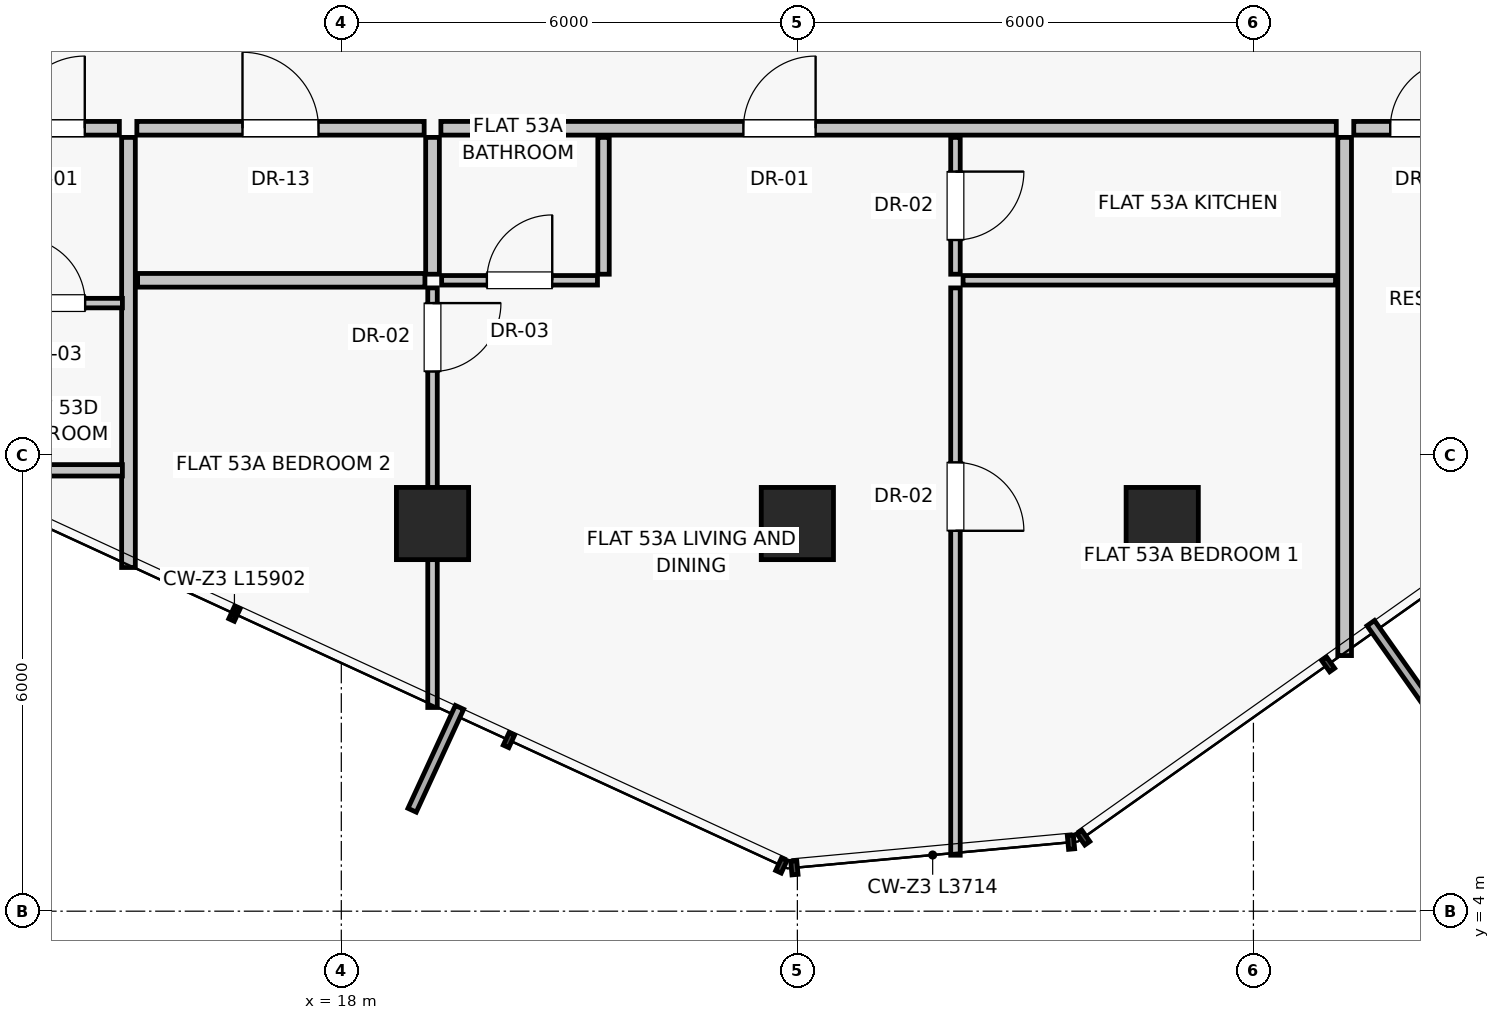
"""IFC4 building model, lengths in metres.
Left out: names, types, materials, properties, quantities, classifications, styles, units other than length and angle.
Written with IfcOpenShell. Run it as: python <this file> out.ifc"""

import sys

from ifc_helpers import new_model, si_unit, direction, frame, frame_2d, origin, origin_2d, place, context, subcontext, project, spatial, rectangle, extrude, source, transform, mapped, element, fill, save


model = new_model("IFC4")
c1 = context("Model", 3, precision=1e-05, world=origin(), true_north=direction((0.0, 1.0)))
c2 = subcontext(c1, "Body", "Model", "MODEL_VIEW")
j1 = project(units=[si_unit("LENGTHUNIT", "METRE"), si_unit("PLANEANGLEUNIT", "RADIAN")], contexts=[c1])
p1 = place(None, origin())
s1 = spatial("IfcSite", under=j1, at=p1, CompositionType="ELEMENT")
p2 = place(p1, origin())
s2 = spatial("IfcBuilding", under=s1, at=p2, CompositionType="ELEMENT")
p3 = place(p2, frame((0.0, 0.0, 188.6)))
s3 = spatial("IfcBuildingStorey", under=s2, at=p3, CompositionType="ELEMENT", Elevation=188.6)
for number, where, z_axis, x_axis in (
    (1, (19.2, 9.1, 0.0), (0.0, 0.0, 1.0), (1.0, 0.0, 0.0)),
    (2, (24.0, 9.1, 0.0), (0.0, 0.0, 1.0), (1.0, 0.0, 0.0)),
    (3, (28.8, 9.1, 0.0), (0.0, 0.0, 1.0), (1.0, 0.0, 0.0)),
):
    element("IfcColumn", number, at=place(p3, frame(where, z_axis=z_axis, x_axis=x_axis)), inside=s3, PredefinedType="COLUMN", context=c2, shape_type="SweptSolid", body=[
        extrude(rectangle(XDim=0.95, YDim=0.95, at=origin_2d()), origin(), (0.0, 0.0, 1.0), 3.25),
    ])
p4 = place(p3, frame((15.2, 14.18, 0.0), z_axis=(0.0, 0.0, 1.0), x_axis=(0.0, -1.0, 0.0)))
e4 = element("IfcWall", 4, at=p4, inside=s3, PredefinedType="PARTITIONING", context=c2, shape_type="SweptSolid", body=[
    extrude(rectangle(XDim=5.658, YDim=0.18, at=frame_2d((2.829, 0.0))), origin(), (0.0, 0.0, 1.0), 3.015),
])
p5 = place(p3, frame((31.2, 14.18, 0.0), z_axis=(0.0, 0.0, 1.0), x_axis=(0.0, -1.0, 0.0)))
e5 = element("IfcWall", 5, at=p5, inside=s3, PredefinedType="PARTITIONING", context=c2, shape_type="SweptSolid", body=[
    extrude(rectangle(XDim=6.817, YDim=0.18, at=frame_2d((3.409, 0.0))), origin(), (0.0, 0.0, 1.0), 3.015),
])
p6 = place(p3, frame((15.31, 14.3, 0.0), z_axis=(0.0, 0.0, 1.0), x_axis=(1.0, 0.0, 0.0)))
e6 = element("IfcWall", 6, at=p6, inside=s3, PredefinedType="PARTITIONING", context=c2, shape_type="SweptSolid", body=[
    extrude(rectangle(XDim=3.78, YDim=0.18, at=frame_2d((1.89, 0.0))), origin(), (0.0, 0.0, 1.0), 3.015),
])
p7 = place(p6, frame((1.39, 0.0, 0.0)))
e7 = element("IfcOpeningElement", 7, at=p7, cuts=e6, PredefinedType="OPENING", context=c2, shape_type="SweptSolid", body=[
    extrude(rectangle(XDim=1.0, YDim=2.01, at=frame_2d((0.5, 1.005))), frame((0.0, 0.1, 0.0), z_axis=(0.0, -1.0, 0.0), x_axis=(1.0, 0.0, 0.0)), (0.0, 0.0, 1.0), 0.2),
])
p8 = place(p3, frame((19.31, 14.3, 0.0), z_axis=(0.0, 0.0, 1.0), x_axis=(1.0, 0.0, 0.0)))
e8 = element("IfcWall", 8, at=p8, inside=s3, PredefinedType="PARTITIONING", context=c2, shape_type="SweptSolid", body=[
    extrude(rectangle(XDim=11.78, YDim=0.18, at=frame_2d((5.89, 0.0))), origin(), (0.0, 0.0, 1.0), 3.015),
])
p9 = place(p8, frame((3.98, 0.0, 0.0)))
e9 = element("IfcOpeningElement", 9, at=p9, cuts=e8, PredefinedType="OPENING", context=c2, shape_type="SweptSolid", body=[
    extrude(rectangle(XDim=0.95, YDim=2.02, at=frame_2d((0.475, 1.01))), frame((0.0, 0.1, 0.0), z_axis=(0.0, -1.0, 0.0), x_axis=(1.0, 0.0, 0.0)), (0.0, 0.0, 1.0), 0.2),
])
p10 = place(p3, frame((15.32, 12.3, 0.0), z_axis=(0.0, 0.0, 1.0), x_axis=(1.0, 0.0, 0.0)))
e10 = element("IfcWall", 10, at=p10, inside=s3, PredefinedType="PARTITIONING", context=c2, shape_type="SweptSolid", body=[
    extrude(rectangle(XDim=3.78, YDim=0.18, at=frame_2d((1.89, 0.0))), origin(), (0.0, 0.0, 1.0), 3.015),
])
p11 = place(p3, frame((19.2, 14.18, 0.0), z_axis=(0.0, 0.0, 1.0), x_axis=(0.0, -1.0, 0.0)))
e11 = element("IfcWall", 11, at=p11, inside=s3, PredefinedType="PARTITIONING", context=c2, shape_type="SweptSolid", body=[
    extrude(rectangle(XDim=1.8, YDim=0.18, at=frame_2d((0.9, 0.0))), origin(), (0.0, 0.0, 1.0), 3.015),
])
p12 = place(p3, frame((19.2, 12.2, 0.0), z_axis=(0.0, 0.0, 1.0), x_axis=(0.0, -1.0, 0.0)))
e12 = element("IfcWall", 12, at=p12, inside=s3, PredefinedType="PARTITIONING", context=c2, shape_type="SweptSolid", body=[
    extrude(rectangle(XDim=5.52, YDim=0.125, at=frame_2d((2.76, 0.0))), origin(), (0.0, 0.0, 1.0), 2.469),
])
p13 = place(p12, frame((0.2, 0.0, 0.0)))
e13 = element("IfcOpeningElement", 13, at=p13, cuts=e12, PredefinedType="OPENING", context=c2, shape_type="SweptSolid", body=[
    extrude(rectangle(XDim=0.9, YDim=2.01, at=frame_2d((0.45, 1.005))), frame((0.0, 0.073, 0.0), z_axis=(0.0, -1.0, 0.0), x_axis=(1.0, 0.0, 0.0)), (0.0, 0.0, 1.0), 0.145),
])
p14 = place(p3, frame((21.45, 14.18, 0.0), z_axis=(0.0, 0.0, 1.0), x_axis=(0.0, -1.0, 0.0)))
e14 = element("IfcWall", 14, at=p14, inside=s3, PredefinedType="PARTITIONING", context=c2, shape_type="SweptSolid", body=[
    extrude(rectangle(XDim=1.8, YDim=0.15, at=frame_2d((0.9, 0.0))), origin(), (0.0, 0.0, 1.0), 3.015),
])
p15 = place(p3, frame((19.32, 12.3, 0.0), z_axis=(0.0, 0.0, 1.0), x_axis=(1.0, 0.0, 0.0)))
e15 = element("IfcWall", 15, at=p15, inside=s3, PredefinedType="PARTITIONING", context=c2, shape_type="SweptSolid", body=[
    extrude(rectangle(XDim=2.05, YDim=0.125, at=frame_2d((1.025, 0.0))), origin(), (0.0, 0.0, 1.0), 3.015),
])
p16 = place(p15, frame((0.595, 0.0, 0.0)))
e16 = element("IfcOpeningElement", 16, at=p16, cuts=e15, PredefinedType="OPENING", context=c2, shape_type="SweptSolid", body=[
    extrude(rectangle(XDim=0.86, YDim=2.01, at=frame_2d((0.43, 1.005))), frame((0.0, 0.073, 0.0), z_axis=(0.0, -1.0, 0.0), x_axis=(1.0, 0.0, 0.0)), (0.0, 0.0, 1.0), 0.145),
])
p17 = place(p3, frame((26.08, 14.18, 0.0), z_axis=(0.0, 0.0, 1.0), x_axis=(0.0, -1.0, 0.0)))
e17 = element("IfcWall", 17, at=p17, inside=s3, PredefinedType="PARTITIONING", context=c2, shape_type="SweptSolid", body=[
    extrude(rectangle(XDim=1.8, YDim=0.125, at=frame_2d((0.9, 0.0))), origin(), (0.0, 0.0, 1.0), 3.015),
])
p18 = place(p17, frame((0.45, 0.0, 0.0)))
e18 = element("IfcOpeningElement", 18, at=p18, cuts=e17, PredefinedType="OPENING", context=c2, shape_type="SweptSolid", body=[
    extrude(rectangle(XDim=0.9, YDim=2.01, at=frame_2d((0.45, 1.005))), frame((0.0, 0.073, 0.0), z_axis=(0.0, -1.0, 0.0), x_axis=(1.0, 0.0, 0.0)), (0.0, 0.0, 1.0), 0.145),
])
p19 = place(p3, frame((26.18, 12.3, 0.0), z_axis=(0.0, 0.0, 1.0), x_axis=(1.0, 0.0, 0.0)))
e19 = element("IfcWall", 19, at=p19, inside=s3, PredefinedType="PARTITIONING", context=c2, shape_type="SweptSolid", body=[
    extrude(rectangle(XDim=4.9, YDim=0.125, at=frame_2d((2.45, 0.0))), origin(), (0.0, 0.0, 1.0), 3.015),
])
p20 = place(p3, frame((26.08, 12.2, 0.0), z_axis=(0.0, 0.0, 1.0), x_axis=(0.0, -1.0, 0.0)))
e20 = element("IfcWall", 20, at=p20, inside=s3, PredefinedType="PARTITIONING", context=c2, shape_type="SweptSolid", body=[
    extrude(rectangle(XDim=7.463, YDim=0.125, at=frame_2d((3.732, 0.0))), origin(), (0.0, 0.0, 1.0), 3.015),
])
p21 = place(p20, frame((2.296, 0.0, 0.0)))
e21 = element("IfcOpeningElement", 21, at=p21, cuts=e20, PredefinedType="OPENING", context=c2, shape_type="SweptSolid", body=[
    extrude(rectangle(XDim=0.9, YDim=2.01, at=frame_2d((0.45, 1.005))), frame((0.0, 0.073, 0.0), z_axis=(0.0, -1.0, 0.0), x_axis=(1.0, 0.0, 0.0)), (0.0, 0.0, 1.0), 0.145),
])
p22 = place(p3, frame((13.22, 14.3, 0.0), z_axis=(0.0, 0.0, 1.0), x_axis=(1.0, 0.0, 0.0)))
e22 = element("IfcWall", 22, at=p22, inside=s3, PredefinedType="PARTITIONING", context=c2, shape_type="SweptSolid", body=[
    extrude(rectangle(XDim=1.86, YDim=0.18, at=frame_2d((0.93, 0.0))), origin(), (0.0, 0.0, 1.0), 3.015),
])
p23 = place(p22, frame((0.455, 0.0, 0.0)))
e23 = element("IfcOpeningElement", 23, at=p23, cuts=e22, PredefinedType="OPENING", context=c2, shape_type="SweptSolid", body=[
    extrude(rectangle(XDim=0.95, YDim=2.02, at=frame_2d((0.475, 1.01))), frame((0.0, 0.1, 0.0), z_axis=(0.0, -1.0, 0.0), x_axis=(1.0, 0.0, 0.0)), (0.0, 0.0, 1.0), 0.2),
])
p24 = place(p3, frame((13.28, 12.0, 0.0), z_axis=(0.0, 0.0, 1.0), x_axis=(1.0, 0.0, 0.0)))
e24 = element("IfcWall", 24, at=p24, inside=s3, PredefinedType="PARTITIONING", context=c2, shape_type="SweptSolid", body=[
    extrude(rectangle(XDim=1.84, YDim=0.125, at=frame_2d((0.92, 0.0))), origin(), (0.0, 0.0, 1.0), 3.015),
])
p25 = place(p24, frame((0.49, 0.0, 0.0)))
e25 = element("IfcOpeningElement", 25, at=p25, cuts=e24, PredefinedType="OPENING", context=c2, shape_type="SweptSolid", body=[
    extrude(rectangle(XDim=0.86, YDim=2.01, at=frame_2d((0.43, 1.005))), frame((0.0, 0.073, 0.0), z_axis=(0.0, -1.0, 0.0), x_axis=(1.0, 0.0, 0.0)), (0.0, 0.0, 1.0), 0.145),
])
p26 = place(p3, frame((13.28, 9.8, 0.0), z_axis=(0.0, 0.0, 1.0), x_axis=(1.0, 0.0, 0.0)))
e26 = element("IfcWall", 26, at=p26, inside=s3, PredefinedType="PARTITIONING", context=c2, shape_type="SweptSolid", body=[
    extrude(rectangle(XDim=1.84, YDim=0.15, at=frame_2d((0.92, 0.0))), origin(), (0.0, 0.0, 1.0), 3.015),
])
p27 = place(p3, frame((31.32, 14.3, 0.0), z_axis=(0.0, 0.0, 1.0), x_axis=(1.0, 0.0, 0.0)))
e27 = element("IfcWall", 27, at=p27, inside=s3, PredefinedType="PARTITIONING", context=c2, shape_type="SweptSolid", body=[
    extrude(rectangle(XDim=1.86, YDim=0.18, at=frame_2d((0.93, 0.0))), origin(), (0.0, 0.0, 1.0), 3.015),
])
p28 = place(p27, frame((0.48, 0.0, 0.0)))
e28 = element("IfcOpeningElement", 28, at=p28, cuts=e27, PredefinedType="OPENING", context=c2, shape_type="SweptSolid", body=[
    extrude(rectangle(XDim=0.9, YDim=2.01, at=frame_2d((0.45, 1.005))), frame((0.0, 0.1, 0.0), z_axis=(0.0, -1.0, 0.0), x_axis=(1.0, 0.0, 0.0)), (0.0, 0.0, 1.0), 0.2),
])
m1 = source(origin(), c2, "Body", "SweptSolid", [
    extrude(rectangle(XDim=1.0, YDim=2.01, at=frame_2d((0.5, 1.005))), frame((0.0, 0.025, 0.0), z_axis=(0.0, -1.0, 0.0), x_axis=(1.0, 0.0, 0.0)), (0.0, 0.0, 1.0), 0.05),
])
p29 = place(p7, origin())
e29 = element("IfcDoor", 29, at=p29, inside=s3, OperationType="SINGLE_SWING_LEFT", PredefinedType="DOOR", context=c2, shape_type="MappedRepresentation", body=[
    mapped(m1, transform((0.0, 0.0, 0.0), scale=1.0)),
])
fill(e7, e29)
m2 = source(origin(), c2, "Body", "SweptSolid", [
    extrude(rectangle(XDim=0.95, YDim=2.02, at=frame_2d((0.475, 1.01))), frame((0.0, 0.025, 0.0), z_axis=(0.0, -1.0, 0.0), x_axis=(1.0, 0.0, 0.0)), (0.0, 0.0, 1.0), 0.05),
])
p30 = place(p9, origin())
e30 = element("IfcDoor", 30, at=p30, inside=s3, OperationType="SINGLE_SWING_RIGHT", PredefinedType="DOOR", context=c2, shape_type="MappedRepresentation", body=[
    mapped(m2, transform((0.0, 0.0, 0.0), scale=1.0)),
])
fill(e9, e30)
m3 = source(origin(), c2, "Body", "SweptSolid", [
    extrude(rectangle(XDim=0.9, YDim=2.01, at=frame_2d((0.45, 1.005))), frame((0.0, 0.025, 0.0), z_axis=(0.0, -1.0, 0.0), x_axis=(1.0, 0.0, 0.0)), (0.0, 0.0, 1.0), 0.05),
])
p31 = place(p13, origin())
e31 = element("IfcDoor", 31, at=p31, inside=s3, OperationType="SINGLE_SWING_LEFT", PredefinedType="DOOR", context=c2, shape_type="MappedRepresentation", body=[
    mapped(m3, transform((0.0, 0.0, 0.0), scale=1.0)),
])
fill(e13, e31)
m4 = source(origin(), c2, "Body", "SweptSolid", [
    extrude(rectangle(XDim=0.86, YDim=2.01, at=frame_2d((0.43, 1.005))), frame((0.0, 0.025, 0.0), z_axis=(0.0, -1.0, 0.0), x_axis=(1.0, 0.0, 0.0)), (0.0, 0.0, 1.0), 0.05),
])
p32 = place(p16, origin())
e32 = element("IfcDoor", 32, at=p32, inside=s3, OperationType="SINGLE_SWING_RIGHT", PredefinedType="DOOR", context=c2, shape_type="MappedRepresentation", body=[
    mapped(m4, transform((0.0, 0.0, 0.0), scale=1.0)),
])
fill(e16, e32)
p33 = place(p18, origin())
e33 = element("IfcDoor", 33, at=p33, inside=s3, OperationType="SINGLE_SWING_LEFT", PredefinedType="DOOR", context=c2, shape_type="MappedRepresentation", body=[
    mapped(m3, transform((0.0, 0.0, 0.0), scale=1.0)),
])
fill(e18, e33)
p34 = place(p21, origin())
e34 = element("IfcDoor", 34, at=p34, inside=s3, OperationType="SINGLE_SWING_RIGHT", PredefinedType="DOOR", context=c2, shape_type="MappedRepresentation", body=[
    mapped(m3, transform((0.0, 0.0, 0.0), scale=1.0)),
])
fill(e21, e34)
p35 = place(p23, origin())
e35 = element("IfcDoor", 35, at=p35, inside=s3, OperationType="SINGLE_SWING_RIGHT", PredefinedType="DOOR", context=c2, shape_type="MappedRepresentation", body=[
    mapped(m2, transform((0.0, 0.0, 0.0), scale=1.0)),
])
fill(e23, e35)
p36 = place(p25, origin())
e36 = element("IfcDoor", 36, at=p36, inside=s3, OperationType="SINGLE_SWING_LEFT", PredefinedType="DOOR", context=c2, shape_type="MappedRepresentation", body=[
    mapped(m4, transform((0.0, 0.0, 0.0), scale=1.0)),
])
fill(e25, e36)
p37 = place(p28, origin())
e37 = element("IfcDoor", 37, at=p37, inside=s3, OperationType="SINGLE_SWING_RIGHT", PredefinedType="DOOR", context=c2, shape_type="MappedRepresentation", body=[
    mapped(m3, transform((0.0, 0.0, 0.0), scale=1.0)),
])
fill(e28, e37)
save(model, sys.argv[1])
